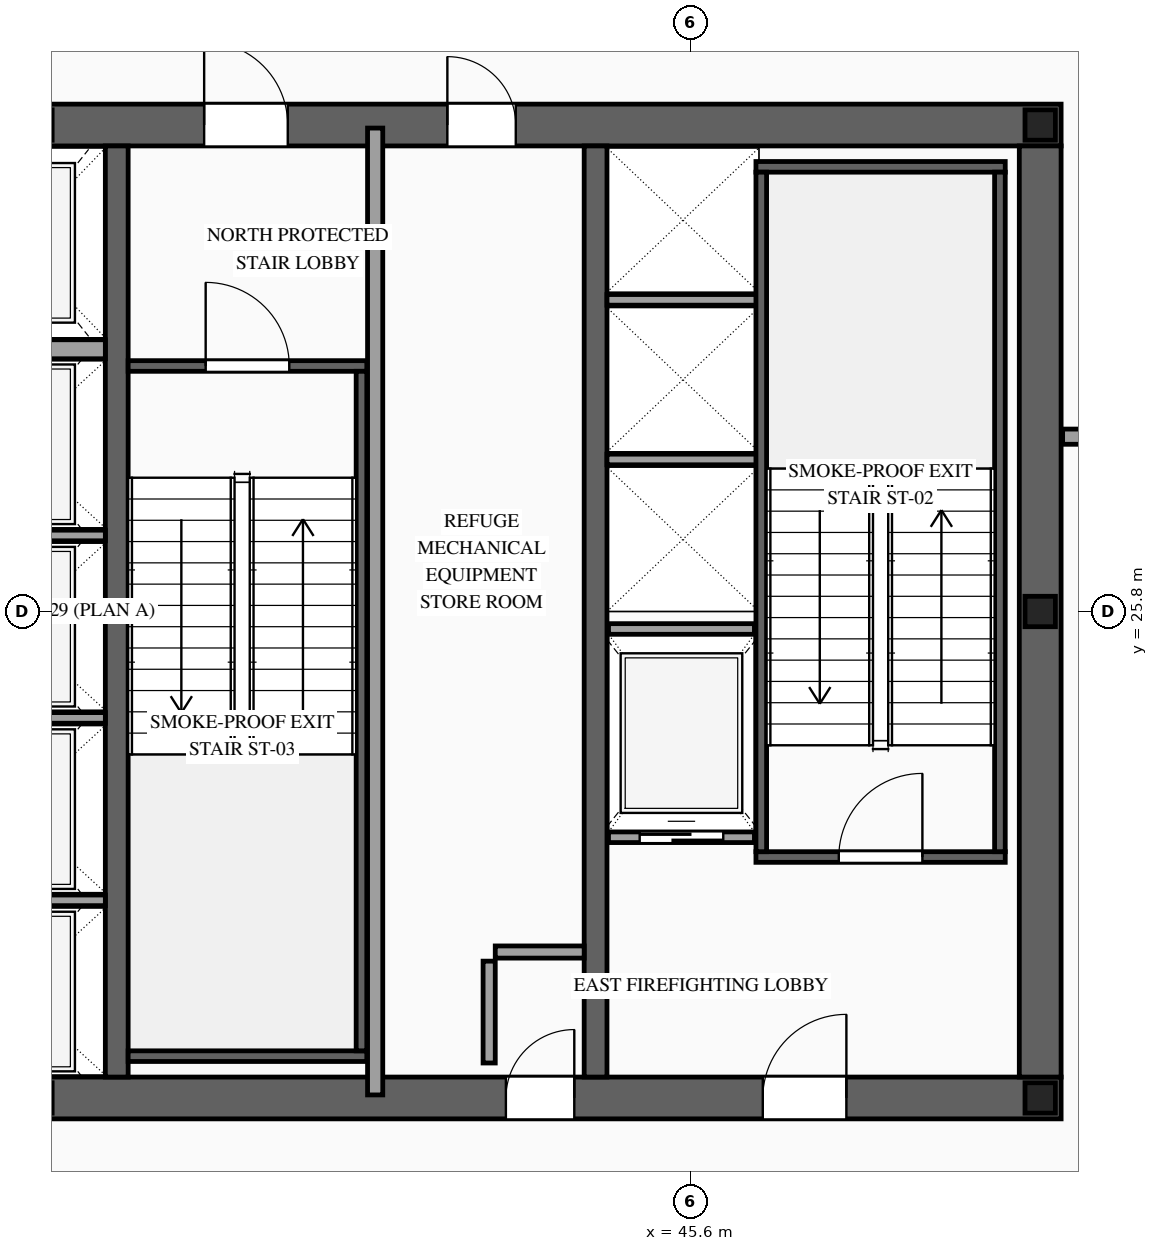
"""IFC4 building model, lengths in metres.
Left out: names, types, materials, properties, quantities, classifications, styles, units other than length and angle.
Written with IfcOpenShell. Run it as: python <this file> out.ifc"""

import sys

from ifc_helpers import new_model, si_unit, direction, frame, frame_2d, origin, origin_2d, place, context, subcontext, project, spatial, rectangle, i_section, extrude, source, transform, mapped, element, fill, save


model = new_model("IFC4")
c1 = context("Model", 3, precision=1e-05, world=origin(), true_north=direction((0.0, 1.0)))
c2 = subcontext(c1, "Body", "Model", "MODEL_VIEW")
j1 = project(units=[si_unit("LENGTHUNIT", "METRE"), si_unit("PLANEANGLEUNIT", "RADIAN")], contexts=[c1])
p1 = place(None, origin())
s1 = spatial("IfcSite", under=j1, at=p1, CompositionType="ELEMENT")
p2 = place(p1, origin())
s2 = spatial("IfcBuilding", under=s1, at=p2, CompositionType="ELEMENT")
p3 = place(p2, frame((0.0, 0.0, 219.5)))
s3 = spatial("IfcBuildingStorey", under=s2, at=p3, CompositionType="ELEMENT", Elevation=219.5)
p4 = place(p3, frame((23.525, 19.4, 0.0), z_axis=(0.0, 0.0, 1.0), x_axis=(1.0, 0.0, 0.0)))
e1 = element("IfcWall", 1, at=p4, inside=s3, PredefinedType="SHEAR", context=c2, shape_type="SweptSolid", body=[
    extrude(rectangle(XDim=26.95, YDim=0.55, at=frame_2d((13.475, 0.0))), origin(), (0.0, 0.0, 1.0), 4.6),
])
p5 = place(p4, frame((1.925, 0.0, 0.0)))
e2 = element("IfcOpeningElement", 2, at=p5, cuts=e1, PredefinedType="OPENING", context=c2, shape_type="SweptSolid", body=[
    extrude(rectangle(XDim=1.1, YDim=2.2, at=frame_2d((0.55, 1.1))), frame((0.0, 0.29, 0.0), z_axis=(0.0, -1.0, 0.0), x_axis=(1.0, 0.0, 0.0)), (0.0, 0.0, 1.0), 0.58),
])
p6 = place(p4, frame((9.825, 0.0, 0.0)))
e3 = element("IfcOpeningElement", 3, at=p6, cuts=e1, PredefinedType="OPENING", context=c2, shape_type="SweptSolid", body=[
    extrude(rectangle(XDim=1.1, YDim=2.2, at=frame_2d((0.55, 1.1))), frame((0.0, 0.29, 0.0), z_axis=(0.0, -1.0, 0.0), x_axis=(1.0, 0.0, 0.0)), (0.0, 0.0, 1.0), 0.58),
])
p7 = place(p4, frame((23.025, 0.0, 0.0)))
e4 = element("IfcOpeningElement", 4, at=p7, cuts=e1, PredefinedType="OPENING", context=c2, shape_type="SweptSolid", body=[
    extrude(rectangle(XDim=1.1, YDim=2.2, at=frame_2d((0.55, 1.1))), frame((0.0, 0.29, 0.0), z_axis=(0.0, -1.0, 0.0), x_axis=(1.0, 0.0, 0.0)), (0.0, 0.0, 1.0), 0.58),
])
p8 = place(p4, frame((19.645, 0.0, 0.0)))
e5 = element("IfcOpeningElement", 5, at=p8, cuts=e1, PredefinedType="OPENING", context=c2, shape_type="SweptSolid", body=[
    extrude(rectangle(XDim=0.9, YDim=2.15, at=frame_2d((0.45, 1.075))), frame((0.0, 0.29, 0.0), z_axis=(0.0, -1.0, 0.0), x_axis=(1.0, 0.0, 0.0)), (0.0, 0.0, 1.0), 0.58),
])
p9 = place(p3, frame((23.525, 32.2, 0.0), z_axis=(0.0, 0.0, 1.0), x_axis=(1.0, 0.0, 0.0)))
e6 = element("IfcWall", 6, at=p9, inside=s3, PredefinedType="SHEAR", context=c2, shape_type="SweptSolid", body=[
    extrude(rectangle(XDim=26.95, YDim=0.55, at=frame_2d((13.475, 0.0))), origin(), (0.0, 0.0, 1.0), 4.6),
])
p10 = place(p9, frame((4.545, 0.0, 0.0)))
e7 = element("IfcOpeningElement", 7, at=p10, cuts=e6, PredefinedType="OPENING", context=c2, shape_type="SweptSolid", body=[
    extrude(rectangle(XDim=0.9, YDim=2.15, at=frame_2d((0.45, 1.075))), frame((0.0, 0.29, 0.0), z_axis=(0.0, -1.0, 0.0), x_axis=(1.0, 0.0, 0.0)), (0.0, 0.0, 1.0), 0.58),
])
p11 = place(p9, frame((9.825, 0.0, 0.0)))
e8 = element("IfcOpeningElement", 8, at=p11, cuts=e6, PredefinedType="OPENING", context=c2, shape_type="SweptSolid", body=[
    extrude(rectangle(XDim=1.1, YDim=2.2, at=frame_2d((0.55, 1.1))), frame((0.0, 0.29, 0.0), z_axis=(0.0, -1.0, 0.0), x_axis=(1.0, 0.0, 0.0)), (0.0, 0.0, 1.0), 0.58),
])
p12 = place(p9, frame((15.675, 0.0, 0.0)))
e9 = element("IfcOpeningElement", 9, at=p12, cuts=e6, PredefinedType="OPENING", context=c2, shape_type="SweptSolid", body=[
    extrude(rectangle(XDim=1.1, YDim=2.2, at=frame_2d((0.55, 1.1))), frame((0.0, 0.29, 0.0), z_axis=(0.0, -1.0, 0.0), x_axis=(1.0, 0.0, 0.0)), (0.0, 0.0, 1.0), 0.58),
])
p13 = place(p9, frame((18.875, 0.0, 0.0)))
e10 = element("IfcOpeningElement", 10, at=p13, cuts=e6, PredefinedType="OPENING", context=c2, shape_type="SweptSolid", body=[
    extrude(rectangle(XDim=0.9, YDim=2.15, at=frame_2d((0.45, 1.075))), frame((0.0, 0.29, 0.0), z_axis=(0.0, -1.0, 0.0), x_axis=(1.0, 0.0, 0.0)), (0.0, 0.0, 1.0), 0.58),
])
m1 = source(origin(), c2, "Body", "SweptSolid", [
    extrude(rectangle(XDim=12.25, YDim=0.55, at=frame_2d((6.125, 0.0))), origin(), (0.0, 0.0, 1.0), 4.6),
])
p14 = place(p3, frame((50.2, 19.675, 0.0), z_axis=(0.0, 0.0, 1.0), x_axis=(0.0, 1.0, 0.0)))
e11 = element("IfcWall", 11, at=p14, inside=s3, PredefinedType="SHEAR", context=c2, shape_type="MappedRepresentation", body=[
    mapped(m1, transform((0.0, 0.0, 0.0), scale=1.0)),
])
m2 = source(origin(), c2, "Body", "SweptSolid", [
    extrude(rectangle(XDim=12.25, YDim=0.3, at=frame_2d((6.125, 0.0))), origin(), (0.0, 0.0, 1.0), 4.6),
])
for number, where, z_axis, x_axis in (
    (12, (38.05, 19.675, 0.0), (0.0, 0.0, 1.0), (0.0, 1.0, 0.0)),
    (13, (44.35, 19.675, 0.0), (0.0, 0.0, 1.0), (0.0, 1.0, 0.0)),
):
    element("IfcWall", number, at=place(p3, frame(where, z_axis=z_axis, x_axis=x_axis)), inside=s3, PredefinedType="SOLIDWALL", context=c2, shape_type="MappedRepresentation", body=[
        mapped(m2, transform((0.0, 0.0, 0.0), scale=1.0)),
    ])
m3 = source(origin(), c2, "Body", "SweptSolid", [
    extrude(i_section(OverallWidth=0.4, OverallDepth=0.4, WebThickness=0.013, FlangeThickness=0.021, at=origin_2d()), origin(), (0.0, 0.0, 1.0), 4.6),
])
for number, where, z_axis, x_axis in (
    (14, (50.2, 19.4, 0.0), (0.0, 0.0, 1.0), (1.0, 0.0, 0.0)),
    (15, (50.2, 25.8, 0.0), (0.0, 0.0, 1.0), (1.0, 0.0, 0.0)),
    (16, (50.2, 32.2, 0.0), (0.0, 0.0, 1.0), (1.0, 0.0, 0.0)),
):
    element("IfcColumn", number, at=place(p3, frame(where, z_axis=z_axis, x_axis=x_axis)), inside=s3, PredefinedType="COLUMN", context=c2, shape_type="MappedRepresentation", body=[
        mapped(m3, transform((0.0, 0.0, 0.0), scale=1.0)),
    ])
p15 = place(p3, frame((44.52, 22.83, 0.0), z_axis=(0.0, 0.0, 1.0), x_axis=(1.0, 0.0, 0.0)))
e17 = element("IfcWall", 17, at=p15, inside=s3, PredefinedType="SOLIDWALL", context=c2, shape_type="SweptSolid", body=[
    extrude(rectangle(XDim=1.92, YDim=0.14, at=frame_2d((0.96, 0.0))), origin(), (0.0, 0.0, 1.0), 4.38),
])
p16 = place(p15, frame((0.41, 0.0, 0.0)))
e18 = element("IfcOpeningElement", 18, at=p16, cuts=e17, PredefinedType="OPENING", context=c2, shape_type="SweptSolid", body=[
    extrude(rectangle(XDim=1.1, YDim=2.2, at=frame_2d((0.55, 1.1))), frame((0.0, 0.085, 0.0), z_axis=(0.0, -1.0, 0.0), x_axis=(1.0, 0.0, 0.0)), (0.0, 0.0, 1.0), 0.17),
])
m4 = source(origin(), c2, "Body", "SweptSolid", [
    extrude(rectangle(XDim=1.92, YDim=0.14, at=frame_2d((0.96, 0.0))), origin(), (0.0, 0.0, 1.0), 4.38),
])
p17 = place(p3, frame((44.52, 25.57, 0.0), z_axis=(0.0, 0.0, 1.0), x_axis=(1.0, 0.0, 0.0)))
e19 = element("IfcWall", 19, at=p17, inside=s3, PredefinedType="SOLIDWALL", context=c2, shape_type="MappedRepresentation", body=[
    mapped(m4, transform((0.0, 0.0, 0.0), scale=1.0)),
])
m5 = source(origin(), c2, "Body", "SweptSolid", [
    extrude(rectangle(XDim=2.4, YDim=0.14, at=frame_2d((1.2, 0.0))), origin(), (0.0, 0.0, 1.0), 4.38),
])
for number, where, z_axis, x_axis in (
    (20, (35.5, 22.0, 0.0), (0.0, 0.0, 1.0), (1.0, 0.0, 0.0)),
    (21, (35.5, 24.4, 0.0), (0.0, 0.0, 1.0), (1.0, 0.0, 0.0)),
    (22, (35.5, 26.8, 0.0), (0.0, 0.0, 1.0), (1.0, 0.0, 0.0)),
):
    element("IfcWall", number, at=place(p3, frame(where, z_axis=z_axis, x_axis=x_axis)), inside=s3, PredefinedType="SOLIDWALL", context=c2, shape_type="MappedRepresentation", body=[
        mapped(m5, transform((0.0, 0.0, 0.0), scale=1.0)),
    ])
m6 = source(origin(), c2, "Body", "SweptSolid", [
    extrude(rectangle(XDim=2.4, YDim=0.25, at=frame_2d((1.2, 0.0))), origin(), (0.0, 0.0, 1.0), 4.38),
])
p18 = place(p3, frame((35.5, 29.25, 0.0), z_axis=(0.0, 0.0, 1.0), x_axis=(1.0, 0.0, 0.0)))
e23 = element("IfcWall", 23, at=p18, inside=s3, PredefinedType="SOLIDWALL", context=c2, shape_type="MappedRepresentation", body=[
    mapped(m6, transform((0.0, 0.0, 0.0), scale=1.0)),
])
m7 = source(origin(), c2, "Body", "SweptSolid", [
    extrude(rectangle(XDim=2.0, YDim=0.14, at=frame_2d((1.0, 0.0))), origin(), (0.0, 0.0, 1.0), 4.38),
])
for number, where, z_axis, x_axis in (
    (24, (44.5, 27.8, 0.0), (0.0, 0.0, 1.0), (1.0, 0.0, 0.0)),
    (25, (44.5, 29.9, 0.0), (0.0, 0.0, 1.0), (1.0, 0.0, 0.0)),
):
    element("IfcWall", number, at=place(p3, frame(where, z_axis=z_axis, x_axis=x_axis)), inside=s3, PredefinedType="SOLIDWALL", context=c2, shape_type="MappedRepresentation", body=[
        mapped(m7, transform((0.0, 0.0, 0.0), scale=1.0)),
    ])
p19 = place(p3, frame((46.46, 22.57, 0.0), z_axis=(0.0, 0.0, 1.0), x_axis=(1.0, 0.0, 0.0)))
e26 = element("IfcWall", 26, at=p19, inside=s3, PredefinedType="SOLIDWALL", context=c2, shape_type="SweptSolid", body=[
    extrude(rectangle(XDim=3.28, YDim=0.14, at=frame_2d((1.64, 0.0))), origin(), (0.0, 0.0, 1.0), 4.38),
])
p20 = place(p19, frame((1.09, 0.0, 0.0)))
e27 = element("IfcOpeningElement", 27, at=p20, cuts=e26, PredefinedType="OPENING", context=c2, shape_type="SweptSolid", body=[
    extrude(rectangle(XDim=1.1, YDim=2.2, at=frame_2d((0.55, 1.1))), frame((0.0, 0.085, 0.0), z_axis=(0.0, -1.0, 0.0), x_axis=(1.0, 0.0, 0.0)), (0.0, 0.0, 1.0), 0.17),
])
m8 = source(origin(), c2, "Body", "SweptSolid", [
    extrude(rectangle(XDim=3.28, YDim=0.14, at=frame_2d((1.64, 0.0))), origin(), (0.0, 0.0, 1.0), 4.38),
])
p21 = place(p3, frame((46.46, 31.65, 0.0), z_axis=(0.0, 0.0, 1.0), x_axis=(1.0, 0.0, 0.0)))
e28 = element("IfcWall", 28, at=p21, inside=s3, PredefinedType="SOLIDWALL", context=c2, shape_type="MappedRepresentation", body=[
    mapped(m8, transform((0.0, 0.0, 0.0), scale=1.0)),
])
m9 = source(origin(), c2, "Body", "SweptSolid", [
    extrude(rectangle(XDim=8.94, YDim=0.14, at=frame_2d((4.47, 0.0))), origin(), (0.0, 0.0, 1.0), 4.38),
])
for number, where, z_axis, x_axis in (
    (29, (46.53, 22.64, 0.0), (0.0, 0.0, 1.0), (0.0, 1.0, 0.0)),
    (30, (49.67, 22.64, 0.0), (0.0, 0.0, 1.0), (0.0, 1.0, 0.0)),
):
    element("IfcWall", number, at=place(p3, frame(where, z_axis=z_axis, x_axis=x_axis)), inside=s3, PredefinedType="SOLIDWALL", context=c2, shape_type="MappedRepresentation", body=[
        mapped(m9, transform((0.0, 0.0, 0.0), scale=1.0)),
    ])
p22 = place(p3, frame((38.2, 29.03, 0.0), z_axis=(0.0, 0.0, 1.0), x_axis=(1.0, 0.0, 0.0)))
e31 = element("IfcWall", 31, at=p22, inside=s3, PredefinedType="SOLIDWALL", context=c2, shape_type="SweptSolid", body=[
    extrude(rectangle(XDim=3.14, YDim=0.14, at=frame_2d((1.57, 0.0))), origin(), (0.0, 0.0, 1.0), 4.38),
])
p23 = place(p22, frame((1.02, 0.0, 0.0)))
e32 = element("IfcOpeningElement", 32, at=p23, cuts=e31, PredefinedType="OPENING", context=c2, shape_type="SweptSolid", body=[
    extrude(rectangle(XDim=1.1, YDim=2.2, at=frame_2d((0.55, 1.1))), frame((0.0, 0.085, 0.0), z_axis=(0.0, -1.0, 0.0), x_axis=(1.0, 0.0, 0.0)), (0.0, 0.0, 1.0), 0.17),
])
m10 = source(origin(), c2, "Body", "SweptSolid", [
    extrude(rectangle(XDim=3.14, YDim=0.14, at=frame_2d((1.57, 0.0))), origin(), (0.0, 0.0, 1.0), 4.38),
])
p24 = place(p3, frame((38.2, 19.95, 0.0), z_axis=(0.0, 0.0, 1.0), x_axis=(1.0, 0.0, 0.0)))
e33 = element("IfcWall", 33, at=p24, inside=s3, PredefinedType="SOLIDWALL", context=c2, shape_type="MappedRepresentation", body=[
    mapped(m10, transform((0.0, 0.0, 0.0), scale=1.0)),
])
m11 = source(origin(), c2, "Body", "SweptSolid", [
    extrude(rectangle(XDim=8.94, YDim=0.14, at=frame_2d((4.47, 0.0))), origin(), (0.0, 0.0, 1.0), 4.38),
])
p25 = place(p3, frame((41.27, 20.02, 0.0), z_axis=(0.0, 0.0, 1.0), x_axis=(0.0, 1.0, 0.0)))
e34 = element("IfcWall", 34, at=p25, inside=s3, PredefinedType="SOLIDWALL", context=c2, shape_type="MappedRepresentation", body=[
    mapped(m11, transform((0.0, 0.0, 0.0), scale=1.0)),
])
m12 = source(origin(), c2, "Body", "SweptSolid", [
    extrude(rectangle(XDim=1.34, YDim=0.16, at=frame_2d((0.67, 0.0))), origin(), (0.0, 0.0, 1.0), 4.38),
])
p26 = place(p3, frame((42.95, 19.86, 0.0), z_axis=(0.0, 0.0, 1.0), x_axis=(0.0, 1.0, 0.0)))
e35 = element("IfcWall", 35, at=p26, inside=s3, PredefinedType="PARTITIONING", context=c2, shape_type="MappedRepresentation", body=[
    mapped(m12, transform((0.0, 0.0, 0.0), scale=1.0)),
])
m13 = source(origin(), c2, "Body", "SweptSolid", [
    extrude(rectangle(XDim=1.17, YDim=0.16, at=frame_2d((0.585, 0.0))), origin(), (0.0, 0.0, 1.0), 4.38),
])
p27 = place(p3, frame((43.03, 21.32, 0.0), z_axis=(0.0, 0.0, 1.0), x_axis=(1.0, 0.0, 0.0)))
e36 = element("IfcWall", 36, at=p27, inside=s3, PredefinedType="PARTITIONING", context=c2, shape_type="MappedRepresentation", body=[
    mapped(m13, transform((0.0, 0.0, 0.0), scale=1.0)),
])
m14 = source(origin(), c2, "Body", "SweptSolid", [
    extrude(rectangle(XDim=12.72, YDim=0.2, at=frame_2d((6.36, 0.0))), origin(), (0.0, 0.0, 1.0), 4.38),
])
p28 = place(p3, frame((41.45, 19.44, 0.0), z_axis=(0.0, 0.0, 1.0), x_axis=(0.0, 1.0, 0.0)))
e37 = element("IfcWall", 37, at=p28, inside=s3, PredefinedType="PARTITIONING", context=c2, shape_type="MappedRepresentation", body=[
    mapped(m14, transform((0.0, 0.0, 0.0), scale=1.0)),
])
m15 = source(origin(), c2, "Body", "SweptSolid", [
    extrude(rectangle(XDim=1.555, YDim=0.2, at=frame_2d((0.777, 0.0))), origin(), (0.0, 0.0, 1.0), 4.38),
])
p29 = place(p3, frame((50.495, 28.1, 0.0), z_axis=(0.0, 0.0, 1.0), x_axis=(1.0, 0.0, 0.0)))
e38 = element("IfcWall", 38, at=p29, inside=s3, PredefinedType="PARTITIONING", context=c2, shape_type="MappedRepresentation", body=[
    mapped(m15, transform((0.0, 0.0, 0.0), scale=1.0)),
])
m16 = source(origin(), c2, "Body", "SweptSolid", [
    extrude(rectangle(XDim=1.1, YDim=2.2, at=frame_2d((0.55, 1.1))), frame((0.0, 0.025, 0.0), z_axis=(0.0, -1.0, 0.0), x_axis=(1.0, 0.0, 0.0)), (0.0, 0.0, 1.0), 0.05),
])
p30 = place(p16, origin())
e39 = element("IfcDoor", 39, at=p30, inside=s3, OperationType="SLIDING_TO_RIGHT", PredefinedType="DOOR", context=c2, shape_type="MappedRepresentation", body=[
    mapped(m16, transform((0.0, 0.0, 0.0), scale=1.0)),
])
fill(e18, e39)
m17 = source(origin(), c2, "Body", "SweptSolid", [
    extrude(rectangle(XDim=1.1, YDim=2.2, at=frame_2d((0.55, 1.1))), frame((0.0, 0.025, 0.0), z_axis=(0.0, -1.0, 0.0), x_axis=(1.0, 0.0, 0.0)), (0.0, 0.0, 1.0), 0.05),
])
p31 = place(p20, origin())
e40 = element("IfcDoor", 40, at=p31, inside=s3, OperationType="SINGLE_SWING_RIGHT", PredefinedType="DOOR", context=c2, shape_type="MappedRepresentation", body=[
    mapped(m17, transform((0.0, 0.0, 0.0), scale=1.0)),
])
fill(e27, e40)
p32 = place(p23, origin())
e41 = element("IfcDoor", 41, at=p32, inside=s3, OperationType="SINGLE_SWING_LEFT", PredefinedType="DOOR", context=c2, shape_type="MappedRepresentation", body=[
    mapped(m17, transform((0.0, 0.0, 0.0), scale=1.0)),
])
fill(e32, e41)
p33 = place(p7, origin())
e42 = element("IfcDoor", 42, at=p33, inside=s3, OperationType="SINGLE_SWING_RIGHT", PredefinedType="DOOR", context=c2, shape_type="MappedRepresentation", body=[
    mapped(m17, transform((0.0, 0.0, 0.0), scale=1.0)),
])
fill(e4, e42)
p34 = place(p12, origin())
e43 = element("IfcDoor", 43, at=p34, inside=s3, OperationType="SINGLE_SWING_LEFT", PredefinedType="DOOR", context=c2, shape_type="MappedRepresentation", body=[
    mapped(m17, transform((0.0, 0.0, 0.0), scale=1.0)),
])
fill(e9, e43)
m18 = source(origin(), c2, "Body", "SweptSolid", [
    extrude(rectangle(XDim=0.9, YDim=2.15, at=frame_2d((0.45, 1.075))), frame((0.0, 0.025, 0.0), z_axis=(0.0, -1.0, 0.0), x_axis=(1.0, 0.0, 0.0)), (0.0, 0.0, 1.0), 0.05),
])
p35 = place(p8, origin())
e44 = element("IfcDoor", 44, at=p35, inside=s3, OperationType="SINGLE_SWING_RIGHT", PredefinedType="DOOR", context=c2, shape_type="MappedRepresentation", body=[
    mapped(m18, transform((0.0, 0.0, 0.0), scale=1.0)),
])
fill(e5, e44)
p36 = place(p13, origin())
e45 = element("IfcDoor", 45, at=p36, inside=s3, OperationType="SINGLE_SWING_LEFT", PredefinedType="DOOR", context=c2, shape_type="MappedRepresentation", body=[
    mapped(m18, transform((0.0, 0.0, 0.0), scale=1.0)),
])
fill(e10, e45)
save(model, sys.argv[1])
